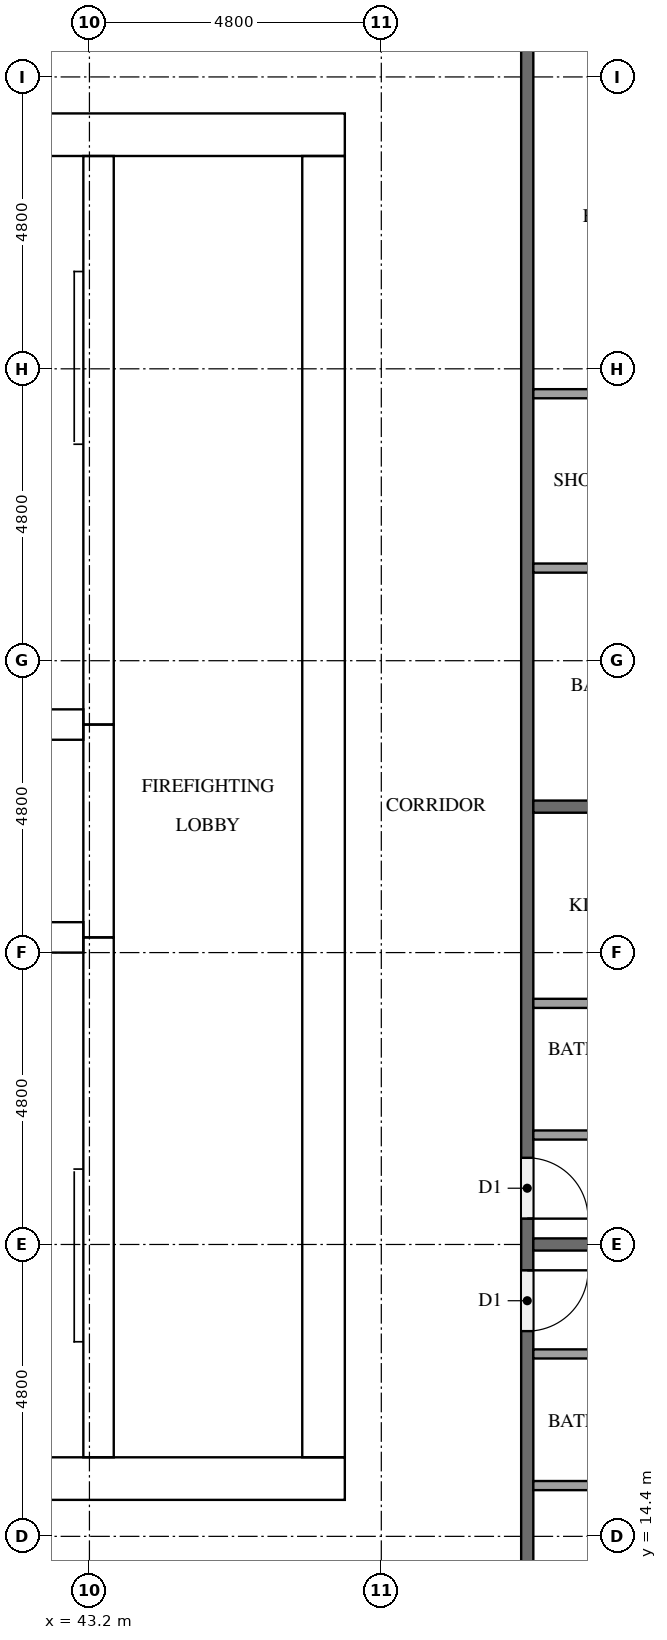
"""IFC4 building model, lengths in metres.
Left out: names, types, materials, properties, quantities, classifications, styles, units other than length and angle.
Written with IfcOpenShell. Run it as: python <this file> out.ifc"""

import sys

from ifc_helpers import new_model, si_unit, direction, frame, frame_2d, origin, place, context, subcontext, project, spatial, rectangle, extrude, element, fill, save


model = new_model("IFC4")
c1 = context("Model", 3, precision=1e-05, world=origin(), true_north=direction((0.0, 1.0)))
c2 = subcontext(c1, "Body", "Model", "MODEL_VIEW")
j1 = project(units=[si_unit("LENGTHUNIT", "METRE"), si_unit("PLANEANGLEUNIT", "RADIAN")], contexts=[c1])
p1 = place(None, origin())
s1 = spatial("IfcSite", under=j1, at=p1, CompositionType="ELEMENT")
p2 = place(p1, origin())
s2 = spatial("IfcBuilding", under=s1, at=p2, CompositionType="ELEMENT")
p3 = place(p2, frame((0.0, 0.0, 189.4)))
s3 = spatial("IfcBuildingStorey", under=s2, at=p3, CompositionType="ELEMENT", Elevation=189.4)
p4 = place(p3, frame((15.0, 15.35, 0.0), z_axis=(0.0, 0.0, 1.0), x_axis=(1.0, 0.0, 0.0)))
e1 = element("IfcWall", 1, at=p4, inside=s3, PredefinedType="SHEAR", context=c2, shape_type="SweptSolid", body=[
    extrude(rectangle(XDim=32.4, YDim=0.7, at=frame_2d((16.2, 0.0))), origin(), (0.0, 0.0, 1.0), 3.2),
])
p5 = place(p4, frame((15.3, 0.0, 0.0)))
e2 = element("IfcOpeningElement", 2, at=p5, cuts=e1, PredefinedType="OPENING", context=c2, shape_type="SweptSolid", body=[
    extrude(rectangle(XDim=1.8, YDim=2.1, at=frame_2d((0.9, 1.05))), frame((0.0, 0.36, 0.0), z_axis=(0.0, -1.0, 0.0), x_axis=(1.0, 0.0, 0.0)), (0.0, 0.0, 1.0), 0.72),
])
p6 = place(p3, frame((15.0, 37.45, 0.0), z_axis=(0.0, 0.0, 1.0), x_axis=(1.0, 0.0, 0.0)))
e3 = element("IfcWall", 3, at=p6, inside=s3, PredefinedType="SHEAR", context=c2, shape_type="SweptSolid", body=[
    extrude(rectangle(XDim=32.4, YDim=0.7, at=frame_2d((16.2, 0.0))), origin(), (0.0, 0.0, 1.0), 3.2),
])
p7 = place(p6, frame((15.3, 0.0, 0.0)))
e4 = element("IfcOpeningElement", 4, at=p7, cuts=e3, PredefinedType="OPENING", context=c2, shape_type="SweptSolid", body=[
    extrude(rectangle(XDim=1.8, YDim=2.1, at=frame_2d((0.9, 1.05))), frame((0.0, 0.36, 0.0), z_axis=(0.0, -1.0, 0.0), x_axis=(1.0, 0.0, 0.0)), (0.0, 0.0, 1.0), 0.72),
])
p8 = place(p6, frame((1.544, 0.0, 0.0)))
e5 = element("IfcOpeningElement", 5, at=p8, cuts=e3, PredefinedType="OPENING", context=c2, shape_type="SweptSolid", body=[
    extrude(rectangle(XDim=1.0, YDim=2.1, at=frame_2d((0.5, 1.05))), frame((0.0, 0.36, 0.0), z_axis=(0.0, -1.0, 0.0), x_axis=(1.0, 0.0, 0.0)), (0.0, 0.0, 1.0), 0.72),
])
p9 = place(p6, frame((5.219, 0.0, 0.0)))
e6 = element("IfcOpeningElement", 6, at=p9, cuts=e3, PredefinedType="OPENING", context=c2, shape_type="SweptSolid", body=[
    extrude(rectangle(XDim=1.0, YDim=2.1, at=frame_2d((0.5, 1.05))), frame((0.0, 0.36, 0.0), z_axis=(0.0, -1.0, 0.0), x_axis=(1.0, 0.0, 0.0)), (0.0, 0.0, 1.0), 0.72),
])
p10 = place(p3, frame((47.05, 15.7, 0.0), z_axis=(0.0, 0.0, 1.0), x_axis=(0.0, 1.0, 0.0)))
e7 = element("IfcWall", 7, at=p10, inside=s3, PredefinedType="SHEAR", context=c2, shape_type="SweptSolid", body=[
    extrude(rectangle(XDim=21.4, YDim=0.7, at=frame_2d((10.7, 0.0))), origin(), (0.0, 0.0, 1.0), 3.2),
])
p11 = place(p10, frame((10.4, 0.0, 0.0)))
e8 = element("IfcOpeningElement", 8, at=p11, cuts=e7, PredefinedType="OPENING", context=c2, shape_type="SweptSolid", body=[
    extrude(rectangle(XDim=1.2, YDim=2.1, at=frame_2d((0.6, 1.05))), frame((0.0, 0.36, 0.0), z_axis=(0.0, -1.0, 0.0), x_axis=(1.0, 0.0, 0.0)), (0.0, 0.0, 1.0), 0.72),
])
p12 = place(p3, frame((43.35, 15.7, 0.0), z_axis=(0.0, 0.0, 1.0), x_axis=(0.0, 1.0, 0.0)))
e9 = element("IfcWall", 9, at=p12, inside=s3, PredefinedType="SHEAR", context=c2, shape_type="SweptSolid", body=[
    extrude(rectangle(XDim=8.55, YDim=0.5, at=frame_2d((4.275, 0.0))), origin(), (0.0, 0.0, 1.0), 3.2),
])
p13 = place(p12, frame((0.5, 0.0, 0.0)))
e10 = element("IfcOpeningElement", 10, at=p13, cuts=e9, PredefinedType="OPENING", context=c2, shape_type="SweptSolid", body=[
    extrude(rectangle(XDim=1.2, YDim=2.1, at=frame_2d((0.6, 1.05))), frame((0.0, 0.26, 0.0), z_axis=(0.0, -1.0, 0.0), x_axis=(1.0, 0.0, 0.0)), (0.0, 0.0, 1.0), 0.52),
])
p14 = place(p3, frame((43.35, 24.25, 0.0), z_axis=(0.0, 0.0, 1.0), x_axis=(0.0, 1.0, 0.0)))
e11 = element("IfcWall", 11, at=p14, inside=s3, PredefinedType="SHEAR", context=c2, shape_type="SweptSolid", body=[
    extrude(rectangle(XDim=3.5, YDim=0.5, at=frame_2d((1.75, 0.0))), origin(), (0.0, 0.0, 1.0), 3.2),
])
p15 = place(p14, frame((1.2, 0.0, 0.0)))
e12 = element("IfcOpeningElement", 12, at=p15, cuts=e11, PredefinedType="OPENING", context=c2, shape_type="SweptSolid", body=[
    extrude(rectangle(XDim=1.1, YDim=2.1, at=frame_2d((0.55, 1.05))), frame((0.0, 0.26, 0.0), z_axis=(0.0, -1.0, 0.0), x_axis=(1.0, 0.0, 0.0)), (0.0, 0.0, 1.0), 0.52),
])
p16 = place(p3, frame((43.35, 27.75, 0.0), z_axis=(0.0, 0.0, 1.0), x_axis=(0.0, 1.0, 0.0)))
e13 = element("IfcWall", 13, at=p16, inside=s3, PredefinedType="SHEAR", context=c2, shape_type="SweptSolid", body=[
    extrude(rectangle(XDim=9.35, YDim=0.5, at=frame_2d((4.675, 0.0))), origin(), (0.0, 0.0, 1.0), 3.2),
])
p17 = place(p16, frame((7.65, 0.0, 0.0)))
e14 = element("IfcOpeningElement", 14, at=p17, cuts=e13, PredefinedType="OPENING", context=c2, shape_type="SweptSolid", body=[
    extrude(rectangle(XDim=1.2, YDim=2.1, at=frame_2d((0.6, 1.05))), frame((0.0, 0.26, 0.0), z_axis=(0.0, -1.0, 0.0), x_axis=(1.0, 0.0, 0.0)), (0.0, 0.0, 1.0), 0.52),
])
for number, where, z_axis, x_axis in (
    (15, (39.55, 24.25, 0.0), (0.0, 0.0, 1.0), (1.0, 0.0, 0.0)),
    (16, (39.55, 27.75, 0.0), (0.0, 0.0, 1.0), (1.0, 0.0, 0.0)),
):
    element("IfcWall", number, at=place(p3, frame(where, z_axis=z_axis, x_axis=x_axis)), inside=s3, PredefinedType="SHEAR", context=c2, shape_type="SweptSolid", body=[
        extrude(rectangle(XDim=3.55, YDim=0.5, at=frame_2d((1.775, 0.0))), origin(), (0.0, 0.0, 1.0), 3.2),
    ])
p18 = place(p3, frame((50.4, 40.7, 0.0), z_axis=(0.0, 0.0, 1.0), x_axis=(0.0, -1.0, 0.0)))
e17 = element("IfcWall", 17, at=p18, inside=s3, PredefinedType="PARTITIONING", context=c2, shape_type="SweptSolid", body=[
    extrude(rectangle(XDim=28.6, YDim=0.2, at=frame_2d((14.3, 0.0))), origin(), (0.0, 0.0, 1.0), 3.2),
])
p19 = place(p18, frame((21.925, 0.0, 0.0)))
e18 = element("IfcOpeningElement", 18, at=p19, cuts=e17, PredefinedType="OPENING", context=c2, shape_type="SweptSolid", body=[
    extrude(rectangle(XDim=1.0, YDim=2.1, at=frame_2d((0.5, 1.05))), frame((0.0, 0.11, 0.0), z_axis=(0.0, -1.0, 0.0), x_axis=(1.0, 0.0, 0.0)), (0.0, 0.0, 1.0), 0.22),
])
p20 = place(p18, frame((20.075, 0.0, 0.0)))
e19 = element("IfcOpeningElement", 19, at=p20, cuts=e17, PredefinedType="OPENING", context=c2, shape_type="SweptSolid", body=[
    extrude(rectangle(XDim=1.0, YDim=2.1, at=frame_2d((0.5, 1.05))), frame((0.0, 0.11, 0.0), z_axis=(0.0, -1.0, 0.0), x_axis=(1.0, 0.0, 0.0)), (0.0, 0.0, 1.0), 0.22),
])
p21 = place(p18, frame((0.325, 0.0, 0.0)))
e20 = element("IfcOpeningElement", 20, at=p21, cuts=e17, PredefinedType="OPENING", context=c2, shape_type="SweptSolid", body=[
    extrude(rectangle(XDim=1.0, YDim=2.1, at=frame_2d((0.5, 1.05))), frame((0.0, 0.11, 0.0), z_axis=(0.0, -1.0, 0.0), x_axis=(1.0, 0.0, 0.0)), (0.0, 0.0, 1.0), 0.22),
])
for number, where, z_axis, x_axis in (
    (21, (50.5, 19.2, 0.0), (0.0, 0.0, 1.0), (1.0, 0.0, 0.0)),
    (22, (50.5, 26.4, 0.0), (0.0, 0.0, 1.0), (1.0, 0.0, 0.0)),
):
    element("IfcWall", number, at=place(p3, frame(where, z_axis=z_axis, x_axis=x_axis)), inside=s3, PredefinedType="PARTITIONING", context=c2, shape_type="SweptSolid", body=[
        extrude(rectangle(XDim=11.8, YDim=0.2, at=frame_2d((5.9, 0.0))), origin(), (0.0, 0.0, 1.0), 3.2),
    ])
p22 = place(p3, frame((50.5, 15.235, 0.0), z_axis=(0.0, 0.0, 1.0), x_axis=(1.0, 0.0, 0.0)))
e23 = element("IfcWall", 23, at=p22, inside=s3, PredefinedType="PARTITIONING", context=c2, shape_type="SweptSolid", body=[
    extrude(rectangle(XDim=3.875, YDim=0.15, at=frame_2d((1.938, 0.0))), origin(), (0.0, 0.0, 1.0), 3.2),
])
p23 = place(p3, frame((50.5, 17.4, 0.0), z_axis=(0.0, 0.0, 1.0), x_axis=(1.0, 0.0, 0.0)))
e24 = element("IfcWall", 24, at=p23, inside=s3, PredefinedType="PARTITIONING", context=c2, shape_type="SweptSolid", body=[
    extrude(rectangle(XDim=4.025, YDim=0.15, at=frame_2d((2.012, 0.0))), origin(), (0.0, 0.0, 1.0), 3.2),
])
p24 = place(p3, frame((50.5, 23.165, 0.0), z_axis=(0.0, 0.0, 1.0), x_axis=(1.0, 0.0, 0.0)))
e25 = element("IfcWall", 25, at=p24, inside=s3, PredefinedType="PARTITIONING", context=c2, shape_type="SweptSolid", body=[
    extrude(rectangle(XDim=3.275, YDim=0.15, at=frame_2d((1.637, 0.0))), origin(), (0.0, 0.0, 1.0), 3.2),
])
p25 = place(p3, frame((50.5, 21.0, 0.0), z_axis=(0.0, 0.0, 1.0), x_axis=(1.0, 0.0, 0.0)))
e26 = element("IfcWall", 26, at=p25, inside=s3, PredefinedType="PARTITIONING", context=c2, shape_type="SweptSolid", body=[
    extrude(rectangle(XDim=3.425, YDim=0.15, at=frame_2d((1.712, 0.0))), origin(), (0.0, 0.0, 1.0), 3.2),
])
for number, where, z_axis, x_axis in (
    (27, (50.5, 33.19, 0.0), (0.0, 0.0, 1.0), (1.0, 0.0, 0.0)),
    (28, (50.5, 30.323, 0.0), (0.0, 0.0, 1.0), (1.0, 0.0, 0.0)),
):
    element("IfcWall", number, at=place(p3, frame(where, z_axis=z_axis, x_axis=x_axis)), inside=s3, PredefinedType="PARTITIONING", context=c2, shape_type="SweptSolid", body=[
        extrude(rectangle(XDim=3.725, YDim=0.15, at=frame_2d((1.863, 0.0))), origin(), (0.0, 0.0, 1.0), 3.2),
    ])
p26 = place(p15, origin())
e29 = element("IfcDoor", 29, at=p26, inside=s3, OperationType="DOUBLE_DOOR_SLIDING", PredefinedType="DOOR", context=c2, shape_type="SweptSolid", body=[
    extrude(rectangle(XDim=1.1, YDim=2.1, at=frame_2d((0.55, 1.05))), frame((0.0, 0.025, 0.0), z_axis=(0.0, -1.0, 0.0), x_axis=(1.0, 0.0, 0.0)), (0.0, 0.0, 1.0), 0.05),
])
fill(e12, e29)
p27 = place(p13, origin())
e30 = element("IfcDoor", 30, at=p27, inside=s3, OperationType="SINGLE_SWING_RIGHT", PredefinedType="DOOR", context=c2, shape_type="SweptSolid", body=[
    extrude(rectangle(XDim=1.2, YDim=2.1, at=frame_2d((0.6, 1.05))), frame((0.0, 0.025, 0.0), z_axis=(0.0, -1.0, 0.0), x_axis=(1.0, 0.0, 0.0)), (0.0, 0.0, 1.0), 0.05),
])
fill(e10, e30)
p28 = place(p17, origin())
e31 = element("IfcDoor", 31, at=p28, inside=s3, OperationType="SINGLE_SWING_LEFT", PredefinedType="DOOR", context=c2, shape_type="SweptSolid", body=[
    extrude(rectangle(XDim=1.2, YDim=2.1, at=frame_2d((0.6, 1.05))), frame((0.0, 0.025, 0.0), z_axis=(0.0, -1.0, 0.0), x_axis=(1.0, 0.0, 0.0)), (0.0, 0.0, 1.0), 0.05),
])
fill(e14, e31)
p29 = place(p11, origin())
e32 = element("IfcDoor", 32, at=p29, inside=s3, OperationType="SINGLE_SWING_LEFT", PredefinedType="DOOR", context=c2, shape_type="SweptSolid", body=[
    extrude(rectangle(XDim=1.2, YDim=2.1, at=frame_2d((0.6, 1.05))), frame((0.0, 0.025, 0.0), z_axis=(0.0, -1.0, 0.0), x_axis=(1.0, 0.0, 0.0)), (0.0, 0.0, 1.0), 0.05),
])
fill(e8, e32)
p30 = place(p19, origin())
e33 = element("IfcDoor", 33, at=p30, inside=s3, OperationType="SINGLE_SWING_LEFT", PredefinedType="DOOR", context=c2, shape_type="SweptSolid", body=[
    extrude(rectangle(XDim=1.0, YDim=2.1, at=frame_2d((0.5, 1.05))), frame((0.0, 0.025, 0.0), z_axis=(0.0, -1.0, 0.0), x_axis=(1.0, 0.0, 0.0)), (0.0, 0.0, 1.0), 0.05),
])
fill(e18, e33)
p31 = place(p20, origin())
e34 = element("IfcDoor", 34, at=p31, inside=s3, OperationType="SINGLE_SWING_RIGHT", PredefinedType="DOOR", context=c2, shape_type="SweptSolid", body=[
    extrude(rectangle(XDim=1.0, YDim=2.1, at=frame_2d((0.5, 1.05))), frame((0.0, 0.025, 0.0), z_axis=(0.0, -1.0, 0.0), x_axis=(1.0, 0.0, 0.0)), (0.0, 0.0, 1.0), 0.05),
])
fill(e19, e34)
save(model, sys.argv[1])
